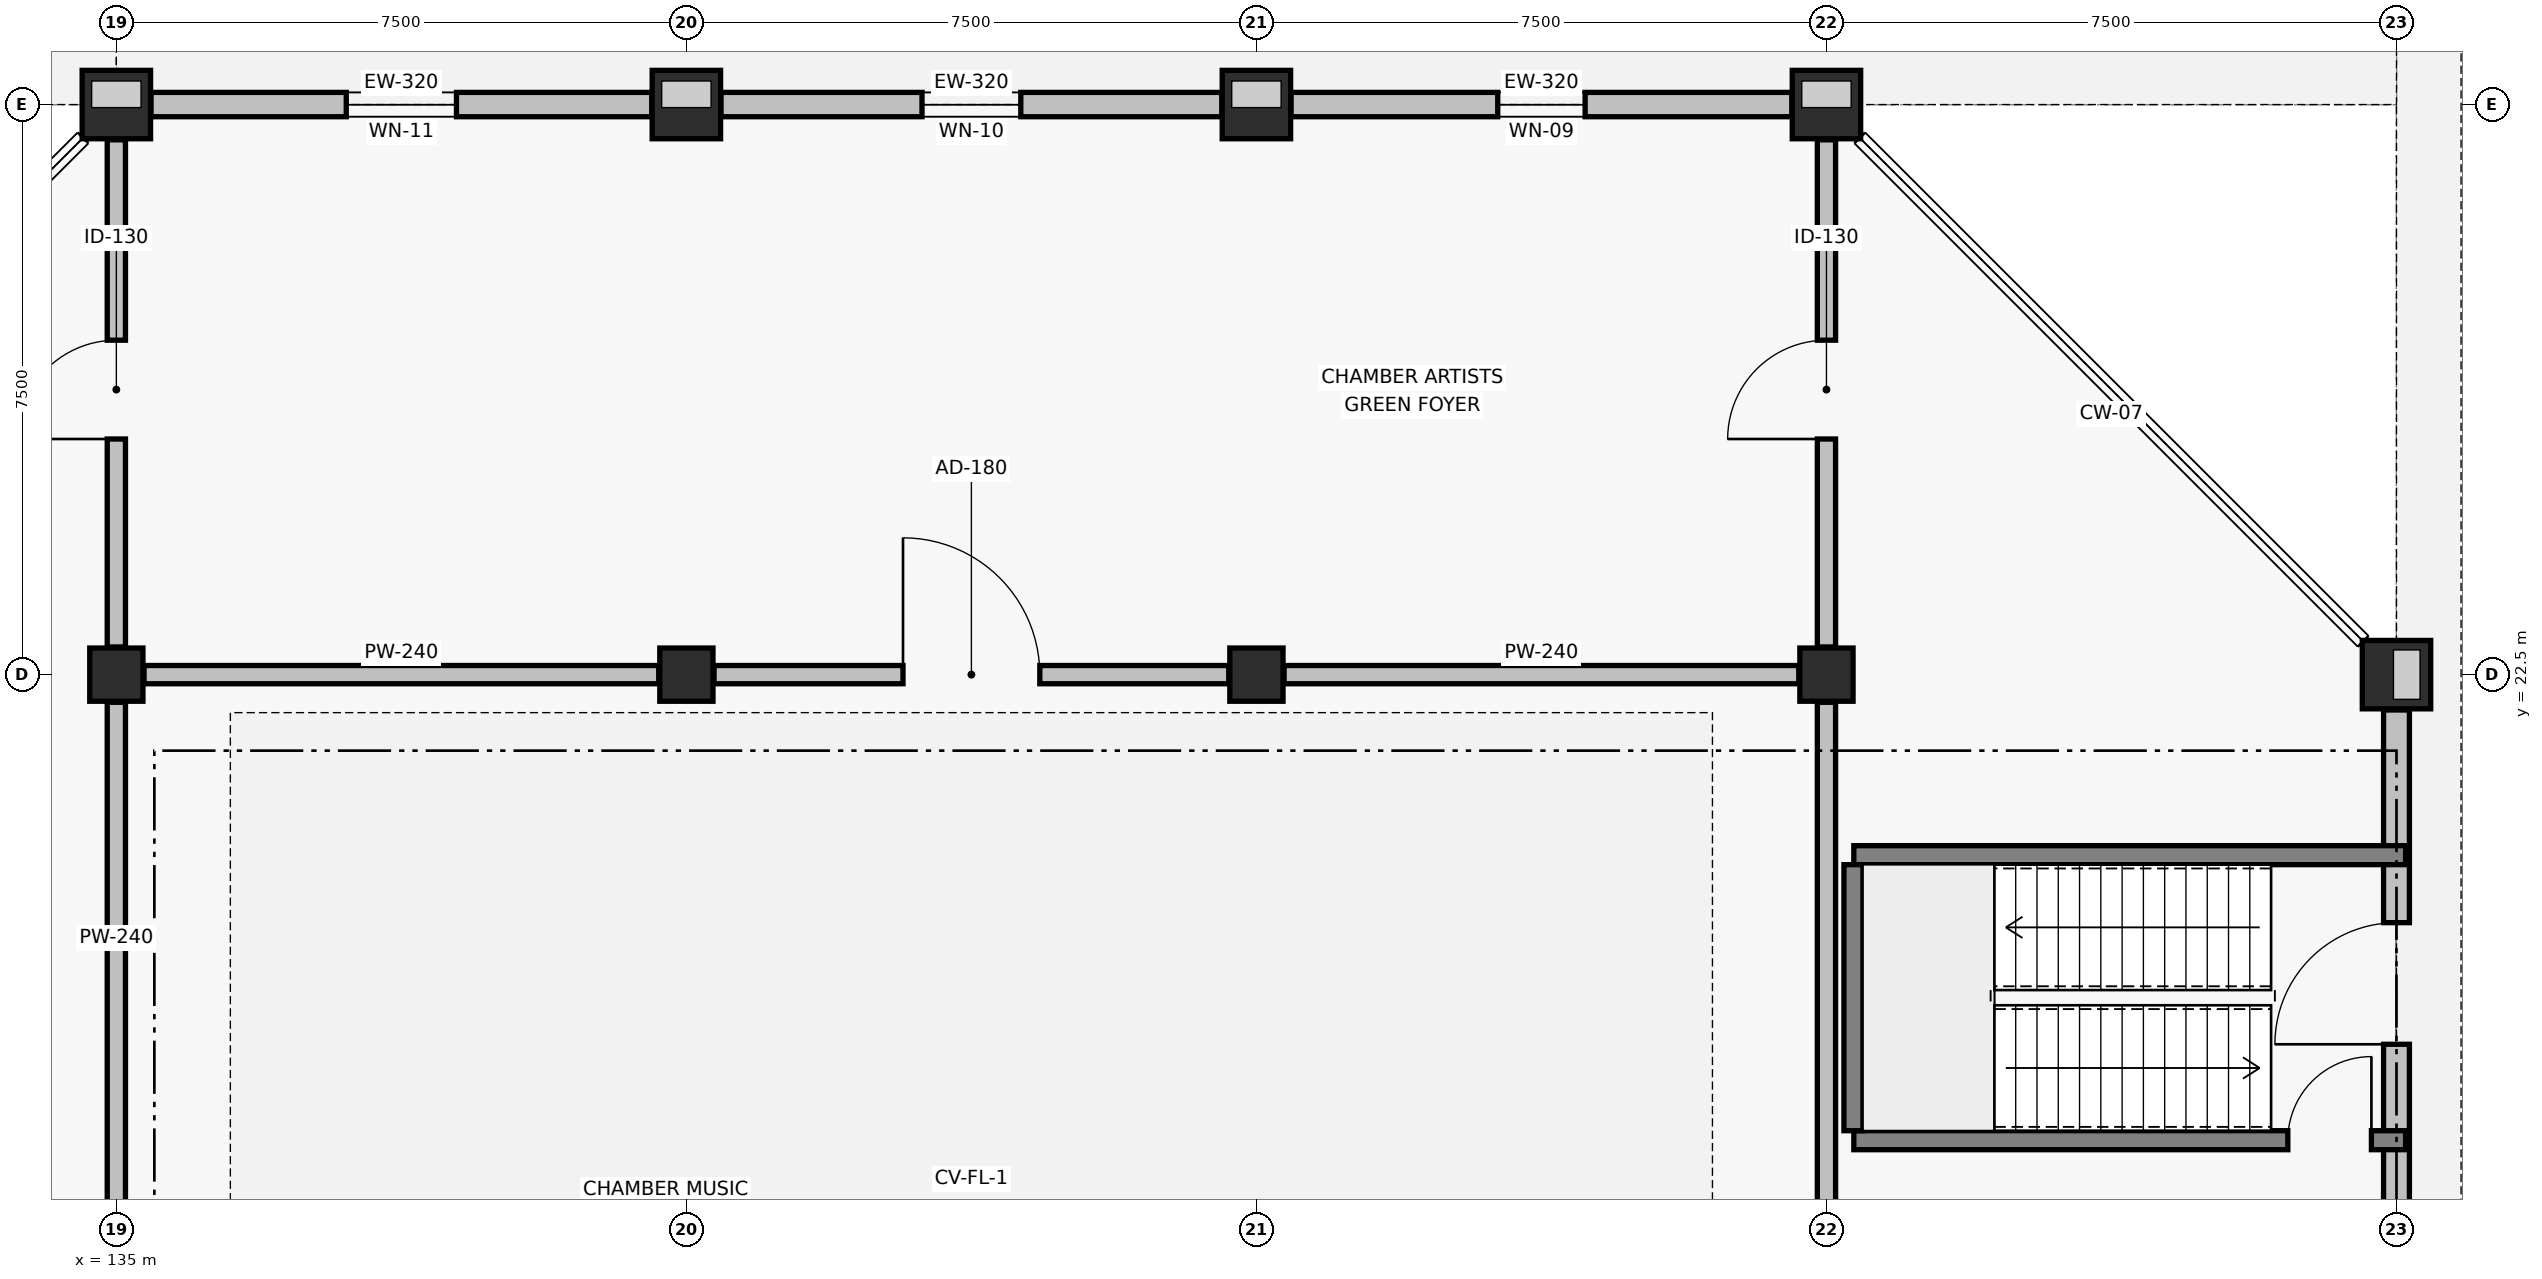
"""IFC4 building model, lengths in metres.
Left out: names, types, materials, properties, quantities, classifications, styles, units other than length and angle.
Written with IfcOpenShell. Run it as: python <this file> out.ifc"""

import sys

from ifc_helpers import new_model, si_unit, direction, frame, frame_2d, origin, origin_2d, place, context, subcontext, project, spatial, rectangle, circle, extrude, element, fill, save


model = new_model("IFC4")
c1 = context("Model", 3, precision=1e-05, world=origin(), true_north=direction((0.0, 1.0)))
c2 = subcontext(c1, "Body", "Model", "MODEL_VIEW")
j1 = project(units=[si_unit("LENGTHUNIT", "METRE"), si_unit("PLANEANGLEUNIT", "RADIAN")], contexts=[c1])
p1 = place(None, origin())
s1 = spatial("IfcSite", under=j1, at=p1, CompositionType="ELEMENT")
p2 = place(p1, origin())
s2 = spatial("IfcBuilding", under=s1, at=p2, CompositionType="ELEMENT")
p3 = place(p2, origin())
s3 = spatial("IfcBuildingStorey", under=s2, at=p3, CompositionType="ELEMENT", Elevation=0.0)
p4 = place(p3, frame((135.0, 22.5, 0.0), z_axis=(0.0, 0.0, 1.0), x_axis=(1.0, 0.0, 0.0)))
e1 = element("IfcColumn", 1, at=p4, inside=s3, PredefinedType="COLUMN", context=c2, shape_type="SweptSolid", body=[
    extrude(rectangle(XDim=0.7, YDim=0.7, at=origin_2d()), origin(), (0.0, 0.0, 1.0), 4.8),
])
p5 = place(p3, frame((135.0, 30.0, 0.0), z_axis=(0.0, 0.0, 1.0), x_axis=(1.0, 0.0, 0.0)))
e2 = element("IfcColumn", 2, at=p5, inside=s3, PredefinedType="COLUMN", context=c2, shape_type="SweptSolid", body=[
    extrude(circle(Radius=0.45, at=origin_2d()), origin(), (0.0, 0.0, 1.0), 4.8),
])
p6 = place(p3, frame((142.5, 22.5, 0.0), z_axis=(0.0, 0.0, 1.0), x_axis=(1.0, 0.0, 0.0)))
e3 = element("IfcColumn", 3, at=p6, inside=s3, PredefinedType="COLUMN", context=c2, shape_type="SweptSolid", body=[
    extrude(rectangle(XDim=0.7, YDim=0.7, at=origin_2d()), origin(), (0.0, 0.0, 1.0), 4.8),
])
p7 = place(p3, frame((142.5, 30.0, 0.0), z_axis=(0.0, 0.0, 1.0), x_axis=(1.0, 0.0, 0.0)))
e4 = element("IfcColumn", 4, at=p7, inside=s3, PredefinedType="COLUMN", context=c2, shape_type="SweptSolid", body=[
    extrude(circle(Radius=0.45, at=origin_2d()), origin(), (0.0, 0.0, 1.0), 4.8),
])
p8 = place(p3, frame((150.0, 22.5, 0.0), z_axis=(0.0, 0.0, 1.0), x_axis=(1.0, 0.0, 0.0)))
e5 = element("IfcColumn", 5, at=p8, inside=s3, PredefinedType="COLUMN", context=c2, shape_type="SweptSolid", body=[
    extrude(rectangle(XDim=0.7, YDim=0.7, at=origin_2d()), origin(), (0.0, 0.0, 1.0), 4.8),
])
p9 = place(p3, frame((150.0, 30.0, 0.0), z_axis=(0.0, 0.0, 1.0), x_axis=(1.0, 0.0, 0.0)))
e6 = element("IfcColumn", 6, at=p9, inside=s3, PredefinedType="COLUMN", context=c2, shape_type="SweptSolid", body=[
    extrude(circle(Radius=0.45, at=origin_2d()), origin(), (0.0, 0.0, 1.0), 4.8),
])
p10 = place(p3, frame((157.5, 22.5, 0.0), z_axis=(0.0, 0.0, 1.0), x_axis=(1.0, 0.0, 0.0)))
e7 = element("IfcColumn", 7, at=p10, inside=s3, PredefinedType="COLUMN", context=c2, shape_type="SweptSolid", body=[
    extrude(rectangle(XDim=0.7, YDim=0.7, at=origin_2d()), origin(), (0.0, 0.0, 1.0), 4.8),
])
for number, where, z_axis, x_axis in (
    (8, (157.5, 30.0, 0.0), (0.0, 0.0, 1.0), (1.0, 0.0, 0.0)),
    (9, (165.0, 22.5, 0.0), (0.0, 0.0, 1.0), (1.0, 0.0, 0.0)),
):
    element("IfcColumn", number, at=place(p3, frame(where, z_axis=z_axis, x_axis=x_axis)), inside=s3, PredefinedType="COLUMN", context=c2, shape_type="SweptSolid", body=[
        extrude(circle(Radius=0.45, at=origin_2d()), origin(), (0.0, 0.0, 1.0), 4.8),
    ])
p11 = place(p3, frame((165.0, 15.465, 0.0), z_axis=(0.0, 0.0, 1.0), x_axis=(0.0, 1.0, 0.0)))
e10 = element("IfcWall", 10, at=p11, inside=s3, PredefinedType="SOLIDWALL", context=c2, shape_type="SweptSolid", body=[
    extrude(rectangle(XDim=6.57, YDim=0.34, at=frame_2d((3.285, 0.0))), origin(), (0.0, 0.0, 1.0), 3.42),
])
p12 = place(p11, frame((2.172, 0.0, 0.0)))
e11 = element("IfcOpeningElement", 11, at=p12, cuts=e10, PredefinedType="OPENING", context=c2, shape_type="SweptSolid", body=[
    extrude(rectangle(XDim=1.6, YDim=2.15, at=frame_2d((0.8, 1.075))), frame((0.0, 0.18, 0.0), z_axis=(0.0, -1.0, 0.0), x_axis=(1.0, 0.0, 0.0)), (0.0, 0.0, 1.0), 0.36),
])
p13 = place(p3, frame((157.045, 30.0, 0.0), z_axis=(0.0, 0.0, 1.0), x_axis=(-1.0, 0.0, 0.0)))
e12 = element("IfcWall", 12, at=p13, inside=s3, PredefinedType="SOLIDWALL", context=c2, shape_type="SweptSolid", body=[
    extrude(rectangle(XDim=6.59, YDim=0.32, at=frame_2d((3.295, 0.0))), origin(), (0.0, 0.0, 1.0), 3.72),
])
p14 = place(p13, frame((2.72, 0.0, 0.6)))
e13 = element("IfcOpeningElement", 13, at=p14, cuts=e12, PredefinedType="OPENING", context=c2, shape_type="SweptSolid", body=[
    extrude(rectangle(XDim=1.15, YDim=1.3, at=frame_2d((0.575, 0.65))), frame((0.0, 0.17, 0.0), z_axis=(0.0, -1.0, 0.0), x_axis=(1.0, 0.0, 0.0)), (0.0, 0.0, 1.0), 0.34),
])
p15 = place(p3, frame((149.545, 30.0, 0.0), z_axis=(0.0, 0.0, 1.0), x_axis=(-1.0, 0.0, 0.0)))
e14 = element("IfcWall", 14, at=p15, inside=s3, PredefinedType="SOLIDWALL", context=c2, shape_type="SweptSolid", body=[
    extrude(rectangle(XDim=6.59, YDim=0.32, at=frame_2d((3.295, 0.0))), origin(), (0.0, 0.0, 1.0), 3.72),
])
p16 = place(p15, frame((2.645, 0.0, 0.6)))
e15 = element("IfcOpeningElement", 15, at=p16, cuts=e14, PredefinedType="OPENING", context=c2, shape_type="SweptSolid", body=[
    extrude(rectangle(XDim=1.3, YDim=1.3, at=frame_2d((0.65, 0.65))), frame((0.0, 0.17, 0.0), z_axis=(0.0, -1.0, 0.0), x_axis=(1.0, 0.0, 0.0)), (0.0, 0.0, 1.0), 0.34),
])
p17 = place(p3, frame((142.045, 30.0, 0.0), z_axis=(0.0, 0.0, 1.0), x_axis=(-1.0, 0.0, 0.0)))
e16 = element("IfcWall", 16, at=p17, inside=s3, PredefinedType="SOLIDWALL", context=c2, shape_type="SweptSolid", body=[
    extrude(rectangle(XDim=6.59, YDim=0.32, at=frame_2d((3.295, 0.0))), origin(), (0.0, 0.0, 1.0), 3.72),
])
p18 = place(p17, frame((2.57, 0.0, 0.6)))
e17 = element("IfcOpeningElement", 17, at=p18, cuts=e16, PredefinedType="OPENING", context=c2, shape_type="SweptSolid", body=[
    extrude(rectangle(XDim=1.45, YDim=1.3, at=frame_2d((0.725, 0.65))), frame((0.0, 0.17, 0.0), z_axis=(0.0, -1.0, 0.0), x_axis=(1.0, 0.0, 0.0)), (0.0, 0.0, 1.0), 0.34),
])
p19 = place(p3, frame((157.86, 16.375, 0.0), z_axis=(0.0, 0.0, 1.0), x_axis=(1.0, 0.0, 0.0)))
e18 = element("IfcWall", 18, at=p19, inside=s3, PredefinedType="SOLIDWALL", context=c2, shape_type="SweptSolid", body=[
    extrude(rectangle(XDim=7.26, YDim=0.25, at=frame_2d((3.63, 0.0))), origin(), (0.0, 0.0, 1.0), 4.5),
])
p20 = place(p19, frame((5.71, 0.0, 0.0)))
e19 = element("IfcOpeningElement", 19, at=p20, cuts=e18, PredefinedType="OPENING", context=c2, shape_type="SweptSolid", body=[
    extrude(rectangle(XDim=1.1, YDim=2.15, at=frame_2d((0.55, 1.075))), frame((0.0, 0.135, 0.0), z_axis=(0.0, -1.0, 0.0), x_axis=(1.0, 0.0, 0.0)), (0.0, 0.0, 1.0), 0.27),
])
p21 = place(p3, frame((157.86, 20.125, 0.0), z_axis=(0.0, 0.0, 1.0), x_axis=(1.0, 0.0, 0.0)))
e20 = element("IfcWall", 20, at=p21, inside=s3, PredefinedType="SOLIDWALL", context=c2, shape_type="SweptSolid", body=[
    extrude(rectangle(XDim=7.26, YDim=0.25, at=frame_2d((3.63, 0.0))), origin(), (0.0, 0.0, 1.0), 4.5),
])
p22 = place(p3, frame((157.855, 16.5, 0.0), z_axis=(0.0, 0.0, 1.0), x_axis=(0.0, 1.0, 0.0)))
e21 = element("IfcWall", 21, at=p22, inside=s3, PredefinedType="SOLIDWALL", context=c2, shape_type="SweptSolid", body=[
    extrude(rectangle(XDim=3.5, YDim=0.25, at=frame_2d((1.75, 0.0))), origin(), (0.0, 0.0, 1.0), 4.5),
])
p23 = place(p3, frame((135.364, 22.5, 0.0), z_axis=(0.0, 0.0, 1.0), x_axis=(1.0, 0.0, 0.0)))
e22 = element("IfcWall", 22, at=p23, inside=s3, PredefinedType="PARTITIONING", context=c2, shape_type="SweptSolid", body=[
    extrude(rectangle(XDim=6.772, YDim=0.24, at=frame_2d((3.386, 0.0))), origin(), (0.0, 0.0, 1.0), 2.97),
])
p24 = place(p3, frame((142.864, 22.5, 0.0), z_axis=(0.0, 0.0, 1.0), x_axis=(1.0, 0.0, 0.0)))
e23 = element("IfcWall", 23, at=p24, inside=s3, PredefinedType="PARTITIONING", context=c2, shape_type="SweptSolid", body=[
    extrude(rectangle(XDim=6.772, YDim=0.24, at=frame_2d((3.386, 0.0))), origin(), (0.0, 0.0, 1.0), 2.97),
])
p25 = place(p24, frame((2.486, 0.0, 0.0)))
e24 = element("IfcOpeningElement", 24, at=p25, cuts=e23, PredefinedType="OPENING", context=c2, shape_type="SweptSolid", body=[
    extrude(rectangle(XDim=1.8, YDim=2.16, at=frame_2d((0.9, 1.08))), frame((0.0, 0.13, 0.0), z_axis=(0.0, -1.0, 0.0), x_axis=(1.0, 0.0, 0.0)), (0.0, 0.0, 1.0), 0.26),
])
p26 = place(p3, frame((150.364, 22.5, 0.0), z_axis=(0.0, 0.0, 1.0), x_axis=(1.0, 0.0, 0.0)))
e25 = element("IfcWall", 25, at=p26, inside=s3, PredefinedType="PARTITIONING", context=c2, shape_type="SweptSolid", body=[
    extrude(rectangle(XDim=6.772, YDim=0.24, at=frame_2d((3.386, 0.0))), origin(), (0.0, 0.0, 1.0), 2.97),
])
p27 = place(p3, frame((135.0, 15.364, 0.0), z_axis=(0.0, 0.0, 1.0), x_axis=(0.0, 1.0, 0.0)))
e26 = element("IfcWall", 26, at=p27, inside=s3, PredefinedType="PARTITIONING", context=c2, shape_type="SweptSolid", body=[
    extrude(rectangle(XDim=6.772, YDim=0.24, at=frame_2d((3.386, 0.0))), origin(), (0.0, 0.0, 1.0), 3.42),
])
p28 = place(p3, frame((135.0, 22.864, 0.0), z_axis=(0.0, 0.0, 1.0), x_axis=(0.0, 1.0, 0.0)))
e27 = element("IfcWall", 27, at=p28, inside=s3, PredefinedType="PARTITIONING", context=c2, shape_type="SweptSolid", body=[
    extrude(rectangle(XDim=6.672, YDim=0.24, at=frame_2d((3.336, 0.0))), origin(), (0.0, 0.0, 1.0), 3.42),
])
p29 = place(p28, frame((2.736, 0.0, 0.0)))
e28 = element("IfcOpeningElement", 28, at=p29, cuts=e27, PredefinedType="OPENING", context=c2, shape_type="SweptSolid", body=[
    extrude(rectangle(XDim=1.3, YDim=2.15, at=frame_2d((0.65, 1.075))), frame((0.0, 0.13, 0.0), z_axis=(0.0, -1.0, 0.0), x_axis=(1.0, 0.0, 0.0)), (0.0, 0.0, 1.0), 0.26),
])
p30 = place(p3, frame((157.5, 15.364, 0.0), z_axis=(0.0, 0.0, 1.0), x_axis=(0.0, 1.0, 0.0)))
e29 = element("IfcWall", 29, at=p30, inside=s3, PredefinedType="PARTITIONING", context=c2, shape_type="SweptSolid", body=[
    extrude(rectangle(XDim=6.772, YDim=0.24, at=frame_2d((3.386, 0.0))), origin(), (0.0, 0.0, 1.0), 3.42),
])
p31 = place(p3, frame((157.5, 22.864, 0.0), z_axis=(0.0, 0.0, 1.0), x_axis=(0.0, 1.0, 0.0)))
e30 = element("IfcWall", 30, at=p31, inside=s3, PredefinedType="PARTITIONING", context=c2, shape_type="SweptSolid", body=[
    extrude(rectangle(XDim=6.672, YDim=0.24, at=frame_2d((3.336, 0.0))), origin(), (0.0, 0.0, 1.0), 3.42),
])
p32 = place(p31, frame((2.736, 0.0, 0.0)))
e31 = element("IfcOpeningElement", 31, at=p32, cuts=e30, PredefinedType="OPENING", context=c2, shape_type="SweptSolid", body=[
    extrude(rectangle(XDim=1.3, YDim=2.15, at=frame_2d((0.65, 1.075))), frame((0.0, 0.13, 0.0), z_axis=(0.0, -1.0, 0.0), x_axis=(1.0, 0.0, 0.0)), (0.0, 0.0, 1.0), 0.26),
])
p33 = place(p12, frame((1.6, 0.0, 0.0), z_axis=(0.0, 0.0, 1.0), x_axis=(-1.0, 0.0, 0.0)))
e32 = element("IfcDoor", 32, at=p33, inside=s3, OperationType="SINGLE_SWING_RIGHT", PredefinedType="DOOR", context=c2, shape_type="SweptSolid", body=[
    extrude(rectangle(XDim=1.6, YDim=2.15, at=frame_2d((0.8, 1.075))), frame((0.0, 0.025, 0.0), z_axis=(0.0, -1.0, 0.0), x_axis=(1.0, 0.0, 0.0)), (0.0, 0.0, 1.0), 0.05),
])
fill(e11, e32)
p34 = place(p14, origin())
e33 = element("IfcWindow", 33, at=p34, inside=s3, PartitioningType="SINGLE_PANEL", PredefinedType="WINDOW", context=c2, shape_type="SweptSolid", body=[
    extrude(rectangle(XDim=1.15, YDim=1.3, at=frame_2d((0.575, 0.65))), frame((0.0, 0.03, 0.0), z_axis=(0.0, -1.0, 0.0), x_axis=(1.0, 0.0, 0.0)), (0.0, 0.0, 1.0), 0.06),
])
fill(e13, e33)
p35 = place(p16, origin())
e34 = element("IfcWindow", 34, at=p35, inside=s3, PartitioningType="SINGLE_PANEL", PredefinedType="WINDOW", context=c2, shape_type="SweptSolid", body=[
    extrude(rectangle(XDim=1.3, YDim=1.3, at=frame_2d((0.65, 0.65))), frame((0.0, 0.03, 0.0), z_axis=(0.0, -1.0, 0.0), x_axis=(1.0, 0.0, 0.0)), (0.0, 0.0, 1.0), 0.06),
])
fill(e15, e34)
p36 = place(p18, origin())
e35 = element("IfcWindow", 35, at=p36, inside=s3, PartitioningType="SINGLE_PANEL", PredefinedType="WINDOW", context=c2, shape_type="SweptSolid", body=[
    extrude(rectangle(XDim=1.45, YDim=1.3, at=frame_2d((0.725, 0.65))), frame((0.0, 0.03, 0.0), z_axis=(0.0, -1.0, 0.0), x_axis=(1.0, 0.0, 0.0)), (0.0, 0.0, 1.0), 0.06),
])
fill(e17, e35)
p37 = place(p20, origin())
e36 = element("IfcDoor", 36, at=p37, inside=s3, OperationType="SINGLE_SWING_RIGHT", PredefinedType="DOOR", context=c2, shape_type="SweptSolid", body=[
    extrude(rectangle(XDim=1.1, YDim=2.15, at=frame_2d((0.55, 1.075))), frame((0.0, 0.025, 0.0), z_axis=(0.0, -1.0, 0.0), x_axis=(1.0, 0.0, 0.0)), (0.0, 0.0, 1.0), 0.05),
])
fill(e19, e36)
p38 = place(p25, origin())
e37 = element("IfcDoor", 37, at=p38, inside=s3, OperationType="SINGLE_SWING_LEFT", PredefinedType="DOOR", context=c2, shape_type="SweptSolid", body=[
    extrude(rectangle(XDim=1.8, YDim=2.16, at=frame_2d((0.9, 1.08))), frame((0.0, 0.025, 0.0), z_axis=(0.0, -1.0, 0.0), x_axis=(1.0, 0.0, 0.0)), (0.0, 0.0, 1.0), 0.05),
])
fill(e24, e37)
p39 = place(p29, origin())
e38 = element("IfcDoor", 38, at=p39, inside=s3, OperationType="SINGLE_SWING_LEFT", PredefinedType="DOOR", context=c2, shape_type="SweptSolid", body=[
    extrude(rectangle(XDim=1.3, YDim=2.15, at=frame_2d((0.65, 1.075))), frame((0.0, 0.025, 0.0), z_axis=(0.0, -1.0, 0.0), x_axis=(1.0, 0.0, 0.0)), (0.0, 0.0, 1.0), 0.05),
])
fill(e28, e38)
p40 = place(p32, origin())
e39 = element("IfcDoor", 39, at=p40, inside=s3, OperationType="SINGLE_SWING_LEFT", PredefinedType="DOOR", context=c2, shape_type="SweptSolid", body=[
    extrude(rectangle(XDim=1.3, YDim=2.15, at=frame_2d((0.65, 1.075))), frame((0.0, 0.025, 0.0), z_axis=(0.0, -1.0, 0.0), x_axis=(1.0, 0.0, 0.0)), (0.0, 0.0, 1.0), 0.05),
])
fill(e31, e39)
save(model, sys.argv[1])
